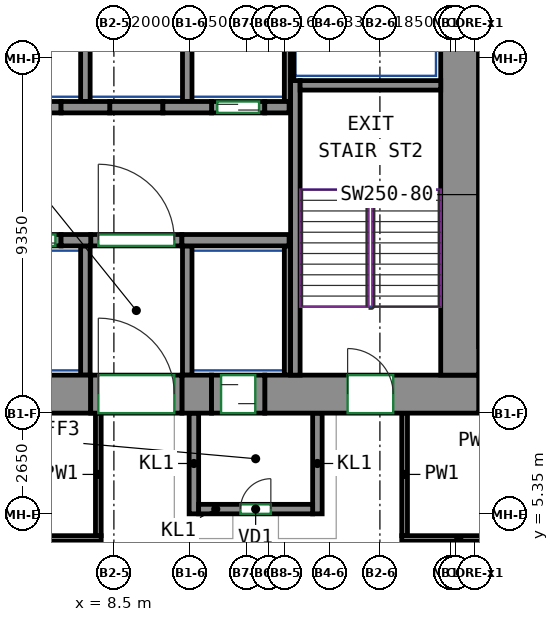
"""IFC4 building model, lengths in metres.
Left out: names, types, materials, properties, quantities, classifications, styles, units other than length and angle.
Written with IfcOpenShell. Run it as: python <this file> out.ifc"""

import sys

from ifc_helpers import new_model, si_unit, direction, frame, frame_2d, origin, place, context, subcontext, project, spatial, rectangle, extrude, source, transform, mapped, element, fill, save


model = new_model("IFC4")
c1 = context("Model", 3, precision=1e-05, world=origin(), true_north=direction((0.0, 1.0)))
c2 = subcontext(c1, "Body", "Model", "MODEL_VIEW")
j1 = project(units=[si_unit("LENGTHUNIT", "METRE"), si_unit("PLANEANGLEUNIT", "RADIAN")], contexts=[c1])
p1 = place(None, origin())
s1 = spatial("IfcSite", under=j1, at=p1, CompositionType="ELEMENT")
p2 = place(p1, origin())
s2 = spatial("IfcBuilding", under=s1, at=p2, CompositionType="ELEMENT")
p3 = place(p2, frame((0.0, 0.0, 83.2)))
s3 = spatial("IfcBuildingStorey", under=s2, at=p3, CompositionType="ELEMENT", Elevation=83.2)
m1 = source(origin(), c2, "Body", "SweptSolid", [
    extrude(rectangle(XDim=14.18, YDim=1.0, at=frame_2d((7.09, 0.0))), origin(), (0.0, 0.0, 1.0), 3.72),
])
p4 = place(p3, frame((-6.29, 8.5, 0.0), z_axis=(0.0, 0.0, 1.0), x_axis=(1.0, 0.0, 0.0)))
e1 = element("IfcWall", 1, at=p4, inside=s3, PredefinedType="SHEAR", context=c2, shape_type="MappedRepresentation", body=[
    mapped(m1, transform((0.0, 0.0, 0.0))),
])
m2 = source(origin(), c2, "Body", "SweptSolid", [
    extrude(rectangle(XDim=0.78, YDim=1.0, at=frame_2d((0.39, 0.0))), origin(), (0.0, 0.0, 1.0), 3.72),
])
p5 = place(p3, frame((10.29, 8.5, 0.0), z_axis=(0.0, 0.0, 1.0), x_axis=(1.0, 0.0, 0.0)))
e2 = element("IfcWall", 2, at=p5, inside=s3, PredefinedType="SHEAR", context=c2, shape_type="MappedRepresentation", body=[
    mapped(m2, transform((0.0, 0.0, 0.0))),
])
m3 = source(origin(), c2, "Body", "SweptSolid", [
    extrude(rectangle(XDim=5.63, YDim=1.0, at=frame_2d((2.815, 0.0))), origin(), (0.0, 0.0, 1.0), 3.72),
])
p6 = place(p3, frame((12.47, 8.5, 0.0), z_axis=(0.0, 0.0, 1.0), x_axis=(1.0, 0.0, 0.0)))
e3 = element("IfcWall", 3, at=p6, inside=s3, PredefinedType="SHEAR", context=c2, shape_type="MappedRepresentation", body=[
    mapped(m3, transform((0.0, 0.0, 0.0))),
])
p7 = place(p6, frame((2.18, 0.0, 0.0)))
e4 = element("IfcOpeningElement", 4, at=p7, cuts=e3, PredefinedType="OPENING", context=c2, shape_type="SweptSolid", body=[
    extrude(rectangle(XDim=1.2, YDim=2.1, at=frame_2d((0.6, 1.05))), frame((0.0, 0.51, 0.0), z_axis=(0.0, -1.0, 0.0), x_axis=(1.0, 0.0, 0.0)), (0.0, 0.0, 1.0), 1.02),
])
m4 = source(origin(), c2, "Body", "SweptSolid", [
    extrude(rectangle(XDim=12.0, YDim=1.0, at=frame_2d((6.0, 0.0))), origin(), (0.0, 0.0, 1.0), 3.72),
])
p8 = place(p3, frame((17.6, 9.0, 0.0), z_axis=(0.0, 0.0, 1.0), x_axis=(0.0, 1.0, 0.0)))
e5 = element("IfcWall", 5, at=p8, inside=s3, PredefinedType="SHEAR", context=c2, shape_type="MappedRepresentation", body=[
    mapped(m4, transform((0.0, 0.0, 0.0))),
])
m5 = source(origin(), c2, "Body", "SweptSolid", [
    extrude(rectangle(XDim=7.75, YDim=0.25, at=frame_2d((3.875, 0.0))), origin(), (0.0, 0.0, 1.0), 3.72),
])
p9 = place(p3, frame((13.275, 9.0, 0.0), z_axis=(0.0, 0.0, 1.0), x_axis=(0.0, 1.0, 0.0)))
e6 = element("IfcWall", 6, at=p9, inside=s3, PredefinedType="SHEAR", context=c2, shape_type="MappedRepresentation", body=[
    mapped(m5, transform((0.0, 0.0, 0.0))),
])
m6 = source(origin(), c2, "Body", "SweptSolid", [
    extrude(rectangle(XDim=3.7, YDim=0.25, at=frame_2d((1.85, 0.0))), origin(), (0.0, 0.0, 1.0), 3.72),
])
p10 = place(p3, frame((13.4, 16.625, 0.0), z_axis=(0.0, 0.0, 1.0), x_axis=(1.0, 0.0, 0.0)))
e7 = element("IfcWall", 7, at=p10, inside=s3, PredefinedType="SHEAR", context=c2, shape_type="MappedRepresentation", body=[
    mapped(m6, transform((0.0, 0.0, 0.0))),
])
m7 = source(origin(), c2, "Body", "SweptSolid", [
    extrude(rectangle(XDim=0.78, YDim=0.3, at=frame_2d((0.39, 0.0))), origin(), (0.0, 0.0, 1.0), 3.72),
])
p11 = place(p3, frame((7.11, 12.55, 0.0), z_axis=(0.0, 0.0, 1.0), x_axis=(1.0, 0.0, 0.0)))
e8 = element("IfcWall", 8, at=p11, inside=s3, PredefinedType="SHEAR", context=c2, shape_type="MappedRepresentation", body=[
    mapped(m7, transform((0.0, 0.0, 0.0))),
])
m8 = source(origin(), c2, "Body", "SweptSolid", [
    extrude(rectangle(XDim=2.82, YDim=0.3, at=frame_2d((1.41, 0.0))), origin(), (0.0, 0.0, 1.0), 3.72),
])
p12 = place(p3, frame((10.29, 12.55, 0.0), z_axis=(0.0, 0.0, 1.0), x_axis=(1.0, 0.0, 0.0)))
e9 = element("IfcWall", 9, at=p12, inside=s3, PredefinedType="SHEAR", context=c2, shape_type="MappedRepresentation", body=[
    mapped(m8, transform((0.0, 0.0, 0.0))),
])
m9 = source(origin(), c2, "Body", "SweptSolid", [
    extrude(rectangle(XDim=1.28, YDim=0.3, at=frame_2d((0.64, 0.0))), origin(), (0.0, 0.0, 1.0), 3.72),
])
p13 = place(p3, frame((7.11, 16.05, 0.0), z_axis=(0.0, 0.0, 1.0), x_axis=(1.0, 0.0, 0.0)))
e10 = element("IfcWall", 10, at=p13, inside=s3, PredefinedType="SHEAR", context=c2, shape_type="MappedRepresentation", body=[
    mapped(m9, transform((0.0, 0.0, 0.0))),
])
m10 = source(origin(), c2, "Body", "SweptSolid", [
    extrude(rectangle(XDim=1.28, YDim=0.3, at=frame_2d((0.64, 0.0))), origin(), (0.0, 0.0, 1.0), 3.72),
])
p14 = place(p3, frame((9.79, 16.05, 0.0), z_axis=(0.0, 0.0, 1.0), x_axis=(1.0, 0.0, 0.0)))
e11 = element("IfcWall", 11, at=p14, inside=s3, PredefinedType="SHEAR", context=c2, shape_type="MappedRepresentation", body=[
    mapped(m10, transform((0.0, 0.0, 0.0))),
])
m11 = source(origin(), c2, "Body", "SweptSolid", [
    extrude(rectangle(XDim=0.64, YDim=0.3, at=frame_2d((0.32, 0.0))), origin(), (0.0, 0.0, 1.0), 3.72),
])
p15 = place(p3, frame((12.47, 16.05, 0.0), z_axis=(0.0, 0.0, 1.0), x_axis=(1.0, 0.0, 0.0)))
e12 = element("IfcWall", 12, at=p15, inside=s3, PredefinedType="SHEAR", context=c2, shape_type="MappedRepresentation", body=[
    mapped(m11, transform((0.0, 0.0, 0.0))),
])
m12 = source(origin(), c2, "Body", "SweptSolid", [
    extrude(rectangle(XDim=1.4, YDim=0.3, at=frame_2d((0.7, 0.0))), origin(), (0.0, 0.0, 1.0), 3.72),
])
p16 = place(p3, frame((5.71, 12.55, 0.0), z_axis=(0.0, 0.0, 1.0), x_axis=(1.0, 0.0, 0.0)))
e13 = element("IfcWall", 13, at=p16, inside=s3, PredefinedType="PARTITIONING", context=c2, shape_type="MappedRepresentation", body=[
    mapped(m12, transform((0.0, 0.0, 0.0))),
])
p17 = place(p16, frame((0.15, 0.0, 0.0)))
e14 = element("IfcOpeningElement", 14, at=p17, cuts=e13, PredefinedType="OPENING", context=c2, shape_type="SweptSolid", body=[
    extrude(rectangle(XDim=1.1, YDim=2.1, at=frame_2d((0.55, 1.05))), frame((0.0, 0.16, 0.0), z_axis=(0.0, -1.0, 0.0), x_axis=(1.0, 0.0, 0.0)), (0.0, 0.0, 1.0), 0.32),
])
m13 = source(origin(), c2, "Body", "SweptSolid", [
    extrude(rectangle(XDim=1.4, YDim=0.3, at=frame_2d((0.7, 0.0))), origin(), (0.0, 0.0, 1.0), 3.72),
])
p18 = place(p3, frame((11.07, 16.05, 0.0), z_axis=(0.0, 0.0, 1.0), x_axis=(1.0, 0.0, 0.0)))
e15 = element("IfcWall", 15, at=p18, inside=s3, PredefinedType="PARTITIONING", context=c2, shape_type="MappedRepresentation", body=[
    mapped(m13, transform((0.0, 0.0, 0.0))),
])
p19 = place(p18, frame((0.15, 0.0, 0.0)))
e16 = element("IfcOpeningElement", 16, at=p19, cuts=e15, PredefinedType="OPENING", context=c2, shape_type="SweptSolid", body=[
    extrude(rectangle(XDim=1.1, YDim=2.1, at=frame_2d((0.55, 1.05))), frame((0.0, 0.16, 0.0), z_axis=(0.0, -1.0, 0.0), x_axis=(1.0, 0.0, 0.0)), (0.0, 0.0, 1.0), 0.32),
])
m14 = source(origin(), c2, "Body", "SweptSolid", [
    extrude(rectangle(XDim=2.4, YDim=0.3, at=frame_2d((1.2, 0.0))), origin(), (0.0, 0.0, 1.0), 3.72),
])
p20 = place(p3, frame((7.89, 12.55, 0.0), z_axis=(0.0, 0.0, 1.0), x_axis=(1.0, 0.0, 0.0)))
e17 = element("IfcWall", 17, at=p20, inside=s3, PredefinedType="PARTITIONING", context=c2, shape_type="MappedRepresentation", body=[
    mapped(m14, transform((0.0, 0.0, 0.0))),
])
p21 = place(p20, frame((0.2, 0.0, 0.0)))
e18 = element("IfcOpeningElement", 18, at=p21, cuts=e17, PredefinedType="OPENING", context=c2, shape_type="SweptSolid", body=[
    extrude(rectangle(XDim=2.0, YDim=2.1, at=frame_2d((1.0, 1.05))), frame((0.0, 0.16, 0.0), z_axis=(0.0, -1.0, 0.0), x_axis=(1.0, 0.0, 0.0)), (0.0, 0.0, 1.0), 0.32),
])
for number, where, z_axis, x_axis in (
    (19, (5.71, 16.05, 0.0), (0.0, 0.0, 1.0), (1.0, 0.0, 0.0)),
    (20, (8.39, 16.05, 0.0), (0.0, 0.0, 1.0), (1.0, 0.0, 0.0)),
):
    element("IfcWall", number, at=place(p3, frame(where, z_axis=z_axis, x_axis=x_axis)), inside=s3, PredefinedType="PARTITIONING", context=c2, shape_type="MappedRepresentation", body=[
        mapped(m12, transform((0.0, 0.0, 0.0))),
    ])
m15 = source(origin(), c2, "Body", "SweptSolid", [
    extrude(rectangle(XDim=2.65, YDim=0.25, at=frame_2d((1.325, 0.0))), origin(), (0.0, 0.0, 1.0), 3.72),
])
for number, where, z_axis, x_axis in (
    (21, (10.605, 5.35, 0.0), (0.0, 0.0, 1.0), (0.0, 1.0, 0.0)),
    (22, (13.855, 5.35, 0.0), (0.0, 0.0, 1.0), (0.0, 1.0, 0.0)),
):
    element("IfcWall", number, at=place(p3, frame(where, z_axis=z_axis, x_axis=x_axis)), inside=s3, PredefinedType="PARTITIONING", context=c2, shape_type="MappedRepresentation", body=[
        mapped(m15, transform((0.0, 0.0, 0.0))),
    ])
m16 = source(origin(), c2, "Body", "SweptSolid", [
    extrude(rectangle(XDim=3.0, YDim=0.25, at=frame_2d((1.5, 0.0))), origin(), (0.0, 0.0, 1.0), 3.72),
])
p22 = place(p3, frame((10.73, 5.475, 0.0), z_axis=(0.0, 0.0, 1.0), x_axis=(1.0, 0.0, 0.0)))
e23 = element("IfcWall", 23, at=p22, inside=s3, PredefinedType="PARTITIONING", context=c2, shape_type="MappedRepresentation", body=[
    mapped(m16, transform((0.0, 0.0, 0.0))),
])
p23 = place(p22, frame((1.1, 0.0, 0.0)))
e24 = element("IfcOpeningElement", 24, at=p23, cuts=e23, PredefinedType="OPENING", context=c2, shape_type="SweptSolid", body=[
    extrude(rectangle(XDim=0.8, YDim=2.0, at=frame_2d((0.4, 1.0))), frame((0.0, 0.135, 0.0), z_axis=(0.0, -1.0, 0.0), x_axis=(1.0, 0.0, 0.0)), (0.0, 0.0, 1.0), 0.27),
])
m17 = source(origin(), c2, "Body", "SweptSolid", [
    extrude(rectangle(XDim=3.275, YDim=0.165, at=frame_2d((1.638, 0.0))), origin(), (0.0, 0.0, 1.0), 3.72),
])
p24 = place(p3, frame((13.067, 16.2, 0.0), z_axis=(0.0, 0.0, 1.0), x_axis=(0.0, 1.0, 0.0)))
e25 = element("IfcWall", 25, at=p24, inside=s3, PredefinedType="PARTITIONING", context=c2, shape_type="MappedRepresentation", body=[
    mapped(m17, transform((0.0, 0.0, 0.0))),
])
m18 = source(origin(), c2, "Body", "SweptSolid", [
    extrude(rectangle(XDim=3.275, YDim=0.25, at=frame_2d((1.638, 0.0))), origin(), (0.0, 0.0, 1.0), 3.72),
])
p25 = place(p3, frame((10.43, 16.2, 0.0), z_axis=(0.0, 0.0, 1.0), x_axis=(0.0, 1.0, 0.0)))
e26 = element("IfcWall", 26, at=p25, inside=s3, PredefinedType="PARTITIONING", context=c2, shape_type="MappedRepresentation", body=[
    mapped(m18, transform((0.0, 0.0, 0.0))),
])
m19 = source(origin(), c2, "Body", "SweptSolid", [
    extrude(rectangle(XDim=2.725, YDim=0.085, at=frame_2d((1.363, 0.0))), origin(), (0.0, 0.0, 1.0), 3.72),
])
p26 = place(p3, frame((13.192, 16.75, 0.0), z_axis=(0.0, 0.0, 1.0), x_axis=(0.0, 1.0, 0.0)))
e27 = element("IfcWall", 27, at=p26, inside=s3, PredefinedType="PARTITIONING", context=c2, shape_type="MappedRepresentation", body=[
    mapped(m19, transform((0.0, 0.0, 0.0))),
])
p27 = place(p3, frame((7.75, 16.2, 0.0), z_axis=(0.0, 0.0, 1.0), x_axis=(0.0, 1.0, 0.0)))
e28 = element("IfcWall", 28, at=p27, inside=s3, PredefinedType="PARTITIONING", context=c2, shape_type="MappedRepresentation", body=[
    mapped(m18, transform((0.0, 0.0, 0.0))),
])
m20 = source(origin(), c2, "Body", "SweptSolid", [
    extrude(rectangle(XDim=3.4, YDim=0.25, at=frame_2d((1.7, 0.0))), origin(), (0.0, 0.0, 1.0), 3.72),
])
p28 = place(p3, frame((10.43, 9.0, 0.0), z_axis=(0.0, 0.0, 1.0), x_axis=(0.0, 1.0, 0.0)))
e29 = element("IfcWall", 29, at=p28, inside=s3, PredefinedType="PARTITIONING", context=c2, shape_type="MappedRepresentation", body=[
    mapped(m20, transform((0.0, 0.0, 0.0))),
])
m21 = source(origin(), c2, "Body", "SweptSolid", [
    extrude(rectangle(XDim=3.4, YDim=0.165, at=frame_2d((1.7, 0.0))), origin(), (0.0, 0.0, 1.0), 3.72),
])
p29 = place(p3, frame((13.067, 9.0, 0.0), z_axis=(0.0, 0.0, 1.0), x_axis=(0.0, 1.0, 0.0)))
e30 = element("IfcWall", 30, at=p29, inside=s3, PredefinedType="PARTITIONING", context=c2, shape_type="MappedRepresentation", body=[
    mapped(m21, transform((0.0, 0.0, 0.0))),
])
p30 = place(p3, frame((7.75, 9.0, 0.0), z_axis=(0.0, 0.0, 1.0), x_axis=(0.0, 1.0, 0.0)))
e31 = element("IfcWall", 31, at=p30, inside=s3, PredefinedType="PARTITIONING", context=c2, shape_type="MappedRepresentation", body=[
    mapped(m20, transform((0.0, 0.0, 0.0))),
])
m22 = source(origin(), c2, "Body", "SweptSolid", [
    extrude(rectangle(XDim=2.4, YDim=1.0, at=frame_2d((1.2, 0.0))), origin(), (0.0, 0.0, 1.0), 2.7),
])
p31 = place(p3, frame((7.89, 8.5, 0.0), z_axis=(0.0, 0.0, 1.0), x_axis=(1.0, 0.0, 0.0)))
e32 = element("IfcWall", 32, at=p31, inside=s3, PredefinedType="PARTITIONING", context=c2, shape_type="MappedRepresentation", body=[
    mapped(m22, transform((0.0, 0.0, 0.0))),
])
p32 = place(p31, frame((0.2, 0.0, 0.0)))
e33 = element("IfcOpeningElement", 33, at=p32, cuts=e32, PredefinedType="OPENING", context=c2, shape_type="SweptSolid", body=[
    extrude(rectangle(XDim=2.0, YDim=2.1, at=frame_2d((1.0, 1.05))), frame((0.0, 0.51, 0.0), z_axis=(0.0, -1.0, 0.0), x_axis=(1.0, 0.0, 0.0)), (0.0, 0.0, 1.0), 1.02),
])
m23 = source(origin(), c2, "Body", "SweptSolid", [
    extrude(rectangle(XDim=1.4, YDim=1.0, at=frame_2d((0.7, 0.0))), origin(), (0.0, 0.0, 1.0), 2.7),
])
p33 = place(p3, frame((11.07, 8.5, 0.0), z_axis=(0.0, 0.0, 1.0), x_axis=(1.0, 0.0, 0.0)))
e34 = element("IfcWall", 34, at=p33, inside=s3, PredefinedType="PARTITIONING", context=c2, shape_type="MappedRepresentation", body=[
    mapped(m23, transform((0.0, 0.0, 0.0))),
])
p34 = place(p33, frame((0.25, 0.0, 0.0)))
e35 = element("IfcOpeningElement", 35, at=p34, cuts=e34, PredefinedType="OPENING", context=c2, shape_type="SweptSolid", body=[
    extrude(rectangle(XDim=0.9, YDim=2.1, at=frame_2d((0.45, 1.05))), frame((0.0, 0.51, 0.0), z_axis=(0.0, -1.0, 0.0), x_axis=(1.0, 0.0, 0.0)), (0.0, 0.0, 1.0), 1.02),
])
p35 = place(p3, frame((-7.805, 4.7, 0.0), z_axis=(0.0, 0.0, 1.0), x_axis=(1.0, 0.0, 0.0)))
e36 = element("IfcWall", 36, at=p35, inside=s3, PredefinedType="PARTITIONING", context=c2, shape_type="SweptSolid", body=[
    extrude(rectangle(XDim=15.97, YDim=0.15, at=frame_2d((7.985, 0.0))), origin(), (0.0, 0.0, 1.0), 3.72),
])
p36 = place(p35, frame((8.439, 0.0, 0.0)))
e37 = element("IfcOpeningElement", 37, at=p36, cuts=e36, PredefinedType="OPENING", context=c2, shape_type="SweptSolid", body=[
    extrude(rectangle(XDim=0.9, YDim=2.1, at=frame_2d((0.45, 1.05))), frame((0.0, 0.085, 0.0), z_axis=(0.0, -1.0, 0.0), x_axis=(1.0, 0.0, 0.0)), (0.0, 0.0, 1.0), 0.17),
])
for number, where, z_axis, x_axis in (
    (38, (8.09, 8.0, 0.0), (0.0, 0.0, 1.0), (0.0, -1.0, 0.0)),
    (39, (16.15, 4.775, 0.0), (0.0, 0.0, 1.0), (0.0, 1.0, 0.0)),
):
    element("IfcWall", number, at=place(p3, frame(where, z_axis=z_axis, x_axis=x_axis)), inside=s3, PredefinedType="PARTITIONING", context=c2, shape_type="SweptSolid", body=[
        extrude(rectangle(XDim=3.225, YDim=0.15, at=frame_2d((1.613, 0.0))), origin(), (0.0, 0.0, 1.0), 3.72),
    ])
p37 = place(p3, frame((16.075, 4.7, 0.0), z_axis=(0.0, 0.0, 1.0), x_axis=(1.0, 0.0, 0.0)))
e40 = element("IfcWall", 40, at=p37, inside=s3, PredefinedType="PARTITIONING", context=c2, shape_type="SweptSolid", body=[
    extrude(rectangle(XDim=3.0, YDim=0.15, at=frame_2d((1.5, 0.0))), origin(), (0.0, 0.0, 1.0), 3.72),
])
p38 = place(p21, origin())
e41 = element("IfcDoor", 41, at=p38, inside=s3, OperationType="DOUBLE_DOOR_SINGLE_SWING", PredefinedType="DOOR", context=c2, shape_type="SweptSolid", body=[
    extrude(rectangle(XDim=2.0, YDim=2.1, at=frame_2d((1.0, 1.05))), frame((0.0, 0.025, 0.0), z_axis=(0.0, -1.0, 0.0), x_axis=(1.0, 0.0, 0.0)), (0.0, 0.0, 1.0), 0.05),
])
fill(e18, e41)
p39 = place(p32, origin())
e42 = element("IfcDoor", 42, at=p39, inside=s3, OperationType="DOUBLE_DOOR_SINGLE_SWING", PredefinedType="DOOR", context=c2, shape_type="SweptSolid", body=[
    extrude(rectangle(XDim=2.0, YDim=2.1, at=frame_2d((1.0, 1.05))), frame((0.0, 0.405, 0.0), z_axis=(0.0, -1.0, 0.0), x_axis=(1.0, 0.0, 0.0)), (0.0, 0.0, 1.0), 0.05),
])
fill(e33, e42)
p40 = place(p23, origin())
e43 = element("IfcDoor", 43, at=p40, inside=s3, OperationType="SINGLE_SWING_RIGHT", PredefinedType="DOOR", context=c2, shape_type="SweptSolid", body=[
    extrude(rectangle(XDim=0.8, YDim=2.0, at=frame_2d((0.4, 1.0))), frame((0.0, 0.025, 0.0), z_axis=(0.0, -1.0, 0.0), x_axis=(1.0, 0.0, 0.0)), (0.0, 0.0, 1.0), 0.05),
])
fill(e24, e43)
p41 = place(p34, origin())
e44 = element("IfcDoor", 44, at=p41, inside=s3, OperationType="SLIDING_TO_LEFT", PredefinedType="DOOR", context=c2, shape_type="SweptSolid", body=[
    extrude(rectangle(XDim=0.9, YDim=2.1, at=frame_2d((0.45, 1.05))), frame((0.0, 0.405, 0.0), z_axis=(0.0, -1.0, 0.0), x_axis=(1.0, 0.0, 0.0)), (0.0, 0.0, 1.0), 0.05),
])
fill(e35, e44)
p42 = place(p17, origin())
e45 = element("IfcDoor", 45, at=p42, inside=s3, OperationType="DOUBLE_DOOR_SLIDING", PredefinedType="DOOR", context=c2, shape_type="SweptSolid", body=[
    extrude(rectangle(XDim=1.1, YDim=2.1, at=frame_2d((0.55, 1.05))), frame((0.0, 0.025, 0.0), z_axis=(0.0, -1.0, 0.0), x_axis=(1.0, 0.0, 0.0)), (0.0, 0.0, 1.0), 0.05),
])
fill(e14, e45)
p43 = place(p19, origin())
e46 = element("IfcDoor", 46, at=p43, inside=s3, OperationType="DOUBLE_DOOR_SLIDING", PredefinedType="DOOR", context=c2, shape_type="SweptSolid", body=[
    extrude(rectangle(XDim=1.1, YDim=2.1, at=frame_2d((0.55, 1.05))), frame((0.0, 0.025, 0.0), z_axis=(0.0, -1.0, 0.0), x_axis=(1.0, 0.0, 0.0)), (0.0, 0.0, 1.0), 0.05),
])
fill(e16, e46)
p44 = place(p7, origin())
e47 = element("IfcDoor", 47, at=p44, inside=s3, OperationType="DOUBLE_DOOR_SINGLE_SWING", PredefinedType="DOOR", context=c2, shape_type="SweptSolid", body=[
    extrude(rectangle(XDim=1.2, YDim=2.1, at=frame_2d((0.6, 1.05))), frame((0.0, 0.405, 0.0), z_axis=(0.0, -1.0, 0.0), x_axis=(1.0, 0.0, 0.0)), (0.0, 0.0, 1.0), 0.05),
])
fill(e4, e47)
save(model, sys.argv[1])
